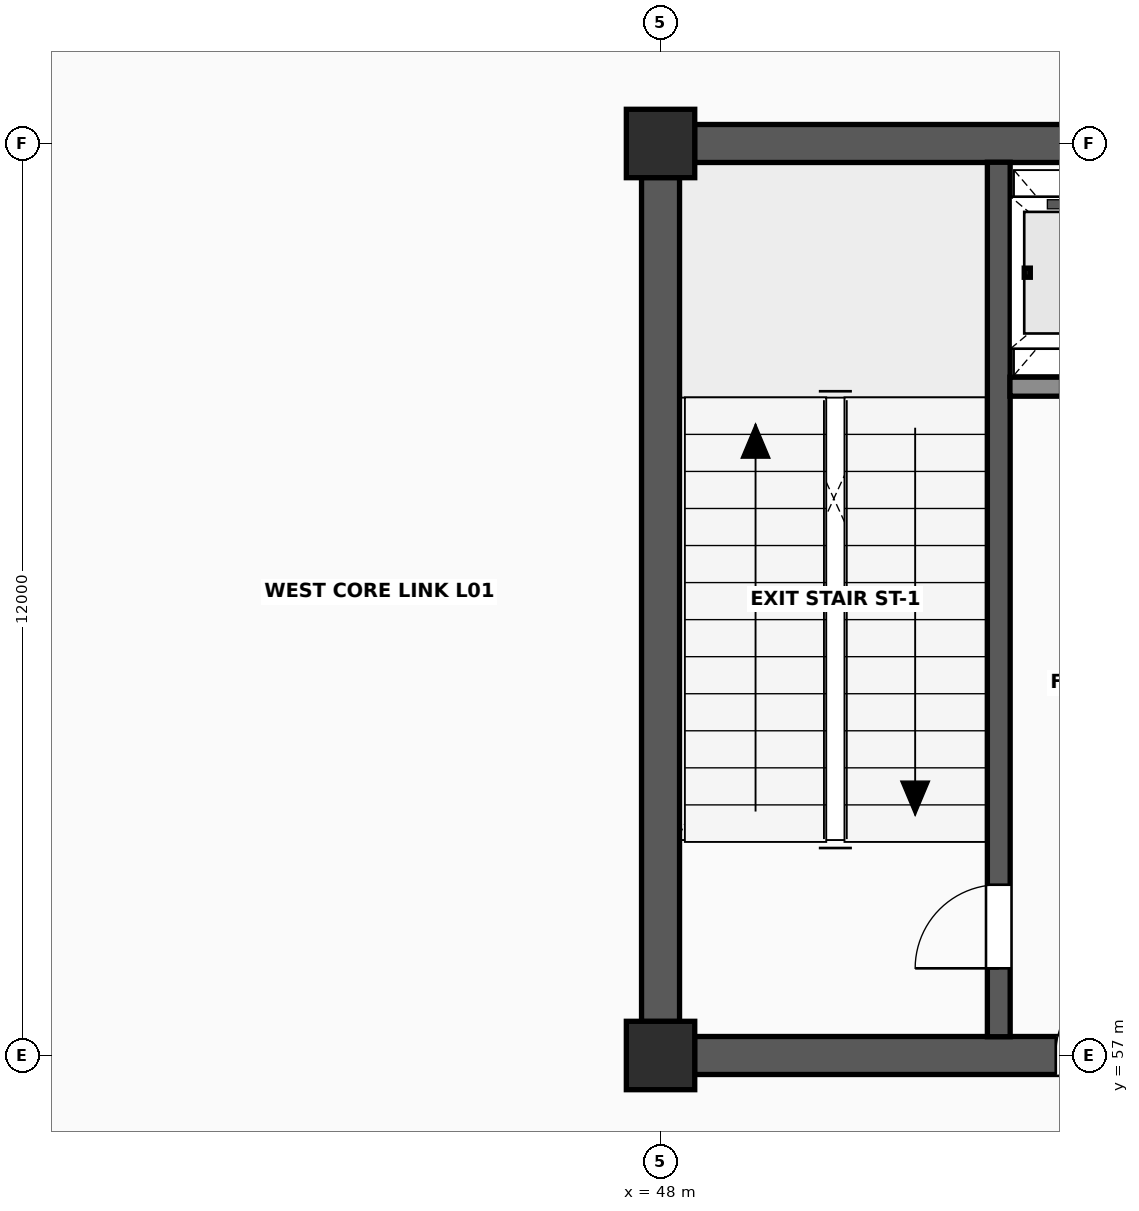
"""IFC4 building model, lengths in metres.
Left out: names, types, materials, properties, quantities, classifications, styles, units other than length and angle.
Written with IfcOpenShell. Run it as: python <this file> out.ifc"""

import sys

from ifc_helpers import new_model, si_unit, direction, frame, frame_2d, origin, origin_2d, place, context, subcontext, project, spatial, rectangle, extrude, element, fill, save


model = new_model("IFC4")
c1 = context("Model", 3, precision=1e-05, world=origin(), true_north=direction((0.0, 1.0)))
c2 = subcontext(c1, "Body", "Model", "MODEL_VIEW")
j1 = project(units=[si_unit("LENGTHUNIT", "METRE"), si_unit("PLANEANGLEUNIT", "RADIAN")], contexts=[c1])
p1 = place(None, origin())
s1 = spatial("IfcSite", under=j1, at=p1, CompositionType="ELEMENT")
p2 = place(p1, origin())
s2 = spatial("IfcBuilding", under=s1, at=p2, CompositionType="ELEMENT")
p3 = place(p2, frame((0.0, 0.0, 5.4)))
s3 = spatial("IfcBuildingStorey", under=s2, at=p3, CompositionType="ELEMENT", Elevation=5.4)
for number, where, z_axis, x_axis in (
    (1, (48.0, 57.0, 0.0), (0.0, 0.0, 1.0), (1.0, 0.0, 0.0)),
    (2, (48.0, 69.0, 0.0), (0.0, 0.0, 1.0), (1.0, 0.0, 0.0)),
):
    element("IfcColumn", number, at=place(p3, frame(where, z_axis=z_axis, x_axis=x_axis)), inside=s3, PredefinedType="COLUMN", context=c2, shape_type="SweptSolid", body=[
        extrude(rectangle(XDim=0.9, YDim=0.9, at=origin_2d()), origin(), (0.0, 0.0, 1.0), 4.2),
    ])
p4 = place(p3, frame((48.447, 57.0, 0.0), z_axis=(0.0, 0.0, 1.0), x_axis=(1.0, 0.0, 0.0)))
e3 = element("IfcWall", 3, at=p4, inside=s3, PredefinedType="SHEAR", context=c2, shape_type="SweptSolid", body=[
    extrude(rectangle(XDim=11.106, YDim=0.5, at=frame_2d((5.553, 0.0))), origin(), (0.0, 0.0, 1.0), 4.043),
])
p5 = place(p4, frame((4.753, 0.0, 0.0)))
e4 = element("IfcOpeningElement", 4, at=p5, cuts=e3, PredefinedType="OPENING", context=c2, shape_type="SweptSolid", body=[
    extrude(rectangle(XDim=1.2, YDim=2.2, at=frame_2d((0.6, 1.1))), frame((0.0, 0.265, 0.0), z_axis=(0.0, -1.0, 0.0), x_axis=(1.0, 0.0, 0.0)), (0.0, 0.0, 1.0), 0.53),
])
p6 = place(p4, frame((8.453, 0.0, 0.0)))
e5 = element("IfcOpeningElement", 5, at=p6, cuts=e3, PredefinedType="OPENING", context=c2, shape_type="SweptSolid", body=[
    extrude(rectangle(XDim=1.5, YDim=2.25, at=frame_2d((0.75, 1.125))), frame((0.0, 0.265, 0.0), z_axis=(0.0, -1.0, 0.0), x_axis=(1.0, 0.0, 0.0)), (0.0, 0.0, 1.0), 0.53),
])
for number, where, z_axis, x_axis in (
    (6, (48.447, 69.0, 0.0), (0.0, 0.0, 1.0), (1.0, 0.0, 0.0)),
    (7, (48.0, 57.447, 0.0), (0.0, 0.0, 1.0), (0.0, 1.0, 0.0)),
):
    element("IfcWall", number, at=place(p3, frame(where, z_axis=z_axis, x_axis=x_axis)), inside=s3, PredefinedType="SHEAR", context=c2, shape_type="SweptSolid", body=[
        extrude(rectangle(XDim=11.106, YDim=0.5, at=frame_2d((5.553, 0.0))), origin(), (0.0, 0.0, 1.0), 4.043),
    ])
p7 = place(p3, frame((52.45, 57.247, 0.0), z_axis=(0.0, 0.0, 1.0), x_axis=(0.0, 1.0, 0.0)))
e8 = element("IfcWall", 8, at=p7, inside=s3, PredefinedType="SHEAR", context=c2, shape_type="SweptSolid", body=[
    extrude(rectangle(XDim=11.506, YDim=0.3, at=frame_2d((5.753, 0.0))), origin(), (0.0, 0.0, 1.0), 4.043),
])
p8 = place(p7, frame((0.9, 0.0, 0.0)))
e9 = element("IfcOpeningElement", 9, at=p8, cuts=e8, PredefinedType="OPENING", context=c2, shape_type="SweptSolid", body=[
    extrude(rectangle(XDim=1.1, YDim=2.2, at=frame_2d((0.55, 1.1))), frame((0.0, 0.165, 0.0), z_axis=(0.0, -1.0, 0.0), x_axis=(1.0, 0.0, 0.0)), (0.0, 0.0, 1.0), 0.33),
])
p9 = place(p3, frame((52.597, 65.8, 0.0), z_axis=(0.0, 0.0, 1.0), x_axis=(1.0, 0.0, 0.0)))
e10 = element("IfcWall", 10, at=p9, inside=s3, PredefinedType="SOLIDWALL", context=c2, shape_type="SweptSolid", body=[
    extrude(rectangle(XDim=7.156, YDim=0.25, at=frame_2d((3.578, 0.0))), origin(), (0.0, 0.0, 1.0), 4.043),
])
p10 = place(p9, frame((0.653, 0.0, 0.0)))
e11 = element("IfcOpeningElement", 11, at=p10, cuts=e10, PredefinedType="OPENING", context=c2, shape_type="SweptSolid", body=[
    extrude(rectangle(XDim=1.1, YDim=2.24, at=frame_2d((0.55, 1.12))), frame((0.0, 0.14, 0.0), z_axis=(0.0, -1.0, 0.0), x_axis=(1.0, 0.0, 0.0)), (0.0, 0.0, 1.0), 0.28),
])
p11 = place(p9, frame((3.153, 0.0, 0.0)))
e12 = element("IfcOpeningElement", 12, at=p11, cuts=e10, PredefinedType="OPENING", context=c2, shape_type="SweptSolid", body=[
    extrude(rectangle(XDim=1.05, YDim=2.2, at=frame_2d((0.525, 1.1))), frame((0.0, 0.14, 0.0), z_axis=(0.0, -1.0, 0.0), x_axis=(1.0, 0.0, 0.0)), (0.0, 0.0, 1.0), 0.28),
])
p12 = place(p9, frame((5.528, 0.0, 0.0)))
e13 = element("IfcOpeningElement", 13, at=p12, cuts=e10, PredefinedType="OPENING", context=c2, shape_type="SweptSolid", body=[
    extrude(rectangle(XDim=1.05, YDim=2.2, at=frame_2d((0.525, 1.1))), frame((0.0, 0.14, 0.0), z_axis=(0.0, -1.0, 0.0), x_axis=(1.0, 0.0, 0.0)), (0.0, 0.0, 1.0), 0.28),
])
p13 = place(p8, origin())
e14 = element("IfcDoor", 14, at=p13, inside=s3, OperationType="SINGLE_SWING_LEFT", PredefinedType="DOOR", context=c2, shape_type="SweptSolid", body=[
    extrude(rectangle(XDim=1.1, YDim=2.2, at=frame_2d((0.55, 1.1))), frame((0.0, 0.025, 0.0), z_axis=(0.0, -1.0, 0.0), x_axis=(1.0, 0.0, 0.0)), (0.0, 0.0, 1.0), 0.05),
])
fill(e9, e14)
p14 = place(p5, origin())
e15 = element("IfcDoor", 15, at=p14, inside=s3, OperationType="SINGLE_SWING_RIGHT", PredefinedType="DOOR", context=c2, shape_type="SweptSolid", body=[
    extrude(rectangle(XDim=1.2, YDim=2.2, at=frame_2d((0.6, 1.1))), frame((0.0, 0.025, 0.0), z_axis=(0.0, -1.0, 0.0), x_axis=(1.0, 0.0, 0.0)), (0.0, 0.0, 1.0), 0.05),
])
fill(e4, e15)
save(model, sys.argv[1])
